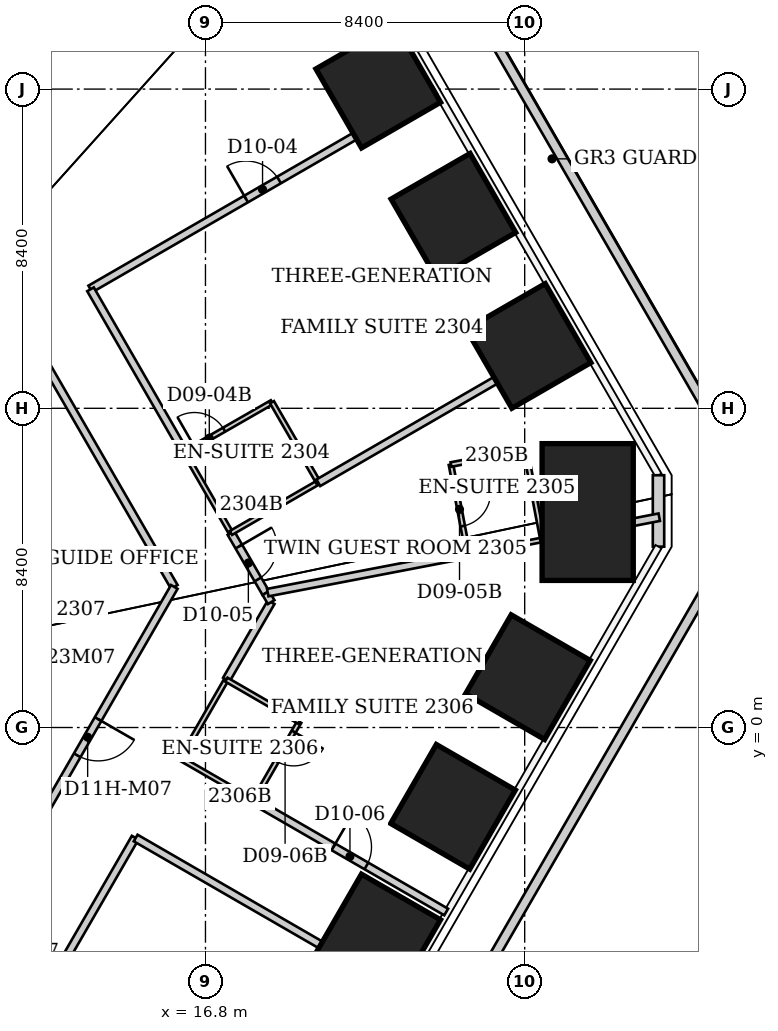
"""IFC4 building model, lengths in metres.
Left out: names, types, materials, properties, quantities, classifications, styles, units other than length and angle.
Written with IfcOpenShell. Run it as: python <this file> out.ifc"""

import sys

from ifc_helpers import new_model, si_unit, direction, frame, frame_2d, origin, origin_2d, place, context, subcontext, project, spatial, rectangle, extrude, clip, halfspace, element, fill, save


model = new_model("IFC4")
c1 = context("Model", 3, precision=1e-05, world=origin(), true_north=direction((0.0, 1.0)))
c2 = subcontext(c1, "Body", "Model", "MODEL_VIEW")
j1 = project(units=[si_unit("LENGTHUNIT", "METRE"), si_unit("PLANEANGLEUNIT", "RADIAN")], contexts=[c1])
p1 = place(None, origin())
s1 = spatial("IfcSite", under=j1, at=p1, CompositionType="ELEMENT")
p2 = place(p1, origin())
s2 = spatial("IfcBuilding", under=s1, at=p2, CompositionType="ELEMENT")
p3 = place(p2, frame((0.0, 0.0, 96.8)))
s3 = spatial("IfcBuildingStorey", under=s2, at=p3, CompositionType="ELEMENT", Elevation=96.8)
p4 = place(p3, frame((21.346, 16.891, -0.063), z_axis=(0.0, 0.0, 1.0), x_axis=(0.866025403784, 0.5, 0.0)))
e1 = element("IfcColumn", 1, at=p4, inside=s3, PredefinedType="COLUMN", context=c2, shape_type="SweptSolid", body=[
    clip(extrude(rectangle(XDim=2.4, YDim=2.4, at=origin_2d()), origin(), (0.0, 0.0, 1.0), 3.863), halfspace(frame((0.0, 0.0, 0.063)), True)),
])
p5 = place(p3, frame((23.324, 13.466, -0.055), z_axis=(0.0, 0.0, 1.0), x_axis=(0.866025403784, 0.5, 0.0)))
e2 = element("IfcColumn", 2, at=p5, inside=s3, PredefinedType="COLUMN", context=c2, shape_type="SweptSolid", body=[
    clip(extrude(rectangle(XDim=2.4, YDim=2.4, at=origin_2d()), origin(), (0.0, 0.0, 1.0), 3.855), halfspace(frame((0.0, 0.0, 0.055)), True)),
])
p6 = place(p3, frame((25.302, 10.041, -0.063), z_axis=(0.0, 0.0, 1.0), x_axis=(0.866025403784, 0.5, 0.0)))
e3 = element("IfcColumn", 3, at=p6, inside=s3, PredefinedType="COLUMN", context=c2, shape_type="SweptSolid", body=[
    clip(extrude(rectangle(XDim=2.4, YDim=2.4, at=origin_2d()), origin(), (0.0, 0.0, 1.0), 3.863), halfspace(frame((0.0, 0.0, 0.063)), True)),
])
p7 = place(p3, frame((26.857, 5.67, -0.074), z_axis=(0.0, 0.0, 1.0), x_axis=(1.0, 0.0, 0.0)))
e4 = element("IfcColumn", 4, at=p7, inside=s3, PredefinedType="COLUMN", context=c2, shape_type="SweptSolid", body=[
    clip(extrude(rectangle(XDim=2.4, YDim=3.6, at=origin_2d()), origin(), (0.0, 0.0, 1.0), 3.874), halfspace(frame((0.0, 0.0, 0.074)), True)),
])
p8 = place(p3, frame((25.284, 1.325, -0.073), z_axis=(0.0, 0.0, 1.0), x_axis=(0.866025403784, -0.5, 0.0)))
e5 = element("IfcColumn", 5, at=p8, inside=s3, PredefinedType="COLUMN", context=c2, shape_type="SweptSolid", body=[
    clip(extrude(rectangle(XDim=2.4, YDim=2.4, at=origin_2d()), origin(), (0.0, 0.0, 1.0), 3.873), halfspace(frame((0.0, 0.0, 0.073)), True)),
])
p9 = place(p3, frame((23.314, -2.087, -0.064), z_axis=(0.0, 0.0, 1.0), x_axis=(0.866025403784, -0.5, 0.0)))
e6 = element("IfcColumn", 6, at=p9, inside=s3, PredefinedType="COLUMN", context=c2, shape_type="SweptSolid", body=[
    clip(extrude(rectangle(XDim=2.4, YDim=2.4, at=origin_2d()), origin(), (0.0, 0.0, 1.0), 3.865), halfspace(frame((0.0, 0.0, 0.064)), True)),
])
p10 = place(p3, frame((21.344, -5.499, -0.056), z_axis=(0.0, 0.0, 1.0), x_axis=(0.866025403784, -0.5, 0.0)))
e7 = element("IfcColumn", 7, at=p10, inside=s3, PredefinedType="COLUMN", context=c2, shape_type="SweptSolid", body=[
    clip(extrude(rectangle(XDim=2.4, YDim=2.4, at=origin_2d()), origin(), (0.0, 0.0, 1.0), 3.856), halfspace(frame((0.0, 0.0, 0.056)), True)),
])
p11 = place(p3, frame((28.721, 6.638, 0.0), z_axis=(0.0, 0.0, 1.0), x_axis=(0.0, -1.0, 0.0)))
e8 = element("IfcWall", 8, at=p11, inside=s3, PredefinedType="SOLIDWALL", context=c2, shape_type="SweptSolid", body=[
    extrude(rectangle(XDim=1.88, YDim=0.3, at=frame_2d((0.94, 0.0))), origin(), (0.0, 0.0, 1.0), 3.64),
])
p12 = place(p3, frame((11.024, -29.171, 0.0), z_axis=(0.0, 0.0, 1.0), x_axis=(0.499999235055, 0.866025845425, 0.0)))
e9 = element("IfcWall", 9, at=p12, inside=s3, PredefinedType="PARAPET", context=c2, shape_type="SweptSolid", body=[
    extrude(rectangle(XDim=39.5, YDim=0.25, at=frame_2d((19.75, 0.0))), origin(), (0.0, 0.0, 1.0), 1.1),
])
p13 = place(p3, frame((30.776, 7.029, 0.0), z_axis=(0.0, 0.0, 1.0), x_axis=(-0.499999656836, 0.86602560191, 0.0)))
e10 = element("IfcWall", 10, at=p13, inside=s3, PredefinedType="PARAPET", context=c2, shape_type="SweptSolid", body=[
    extrude(rectangle(XDim=18.602, YDim=0.25, at=frame_2d((9.301, 0.0))), origin(), (0.0, 0.0, 1.0), 1.1),
])
p14 = place(p3, frame((10.59, -10.45, 0.0), z_axis=(0.0, 0.0, 1.0), x_axis=(0.500072306674, 0.865983653482, 0.0)))
e11 = element("IfcWall", 11, at=p14, inside=s3, PredefinedType="PARTITIONING", context=c2, shape_type="SweptSolid", body=[
    extrude(rectangle(XDim=8.719, YDim=0.2, at=frame_2d((4.359, 0.0))), origin(), (0.0, 0.0, 1.0), 3.64),
])
p15 = place(p14, frame((3.859, 0.0, 0.0)))
e12 = element("IfcOpeningElement", 12, at=p15, cuts=e11, PredefinedType="OPENING", context=c2, shape_type="SweptSolid", body=[
    extrude(rectangle(XDim=1.0, YDim=2.13, at=frame_2d((0.5, 1.065))), frame((0.0, 0.1, 0.0), z_axis=(0.0, -1.0, 0.0), x_axis=(1.0, 0.0, 0.0)), (0.0, 0.0, 1.0), 0.2),
])
p16 = place(p3, frame((11.77, 10.99, 0.0), z_axis=(0.0, 0.0, 1.0), x_axis=(0.500093981358, -0.865971136822, 0.0)))
e13 = element("IfcWall", 13, at=p16, inside=s3, PredefinedType="PARTITIONING", context=c2, shape_type="SweptSolid", body=[
    extrude(rectangle(XDim=8.418, YDim=0.2, at=frame_2d((4.209, 0.0))), origin(), (0.0, 0.0, 1.0), 3.64),
])
p17 = place(p3, frame((13.77, 11.54, 0.0), z_axis=(0.0, 0.0, 1.0), x_axis=(0.865951726818, 0.500127590541, 0.0)))
e14 = element("IfcWall", 14, at=p17, inside=s3, PredefinedType="PARTITIONING", context=c2, shape_type="SweptSolid", body=[
    extrude(rectangle(XDim=10.467, YDim=0.2, at=frame_2d((5.233, 0.0))), origin(), (0.0, 0.0, 1.0), 3.64),
])
p18 = place(p17, frame((4.734, 0.0, 0.0)))
e15 = element("IfcOpeningElement", 15, at=p18, cuts=e14, PredefinedType="OPENING", context=c2, shape_type="SweptSolid", body=[
    extrude(rectangle(XDim=1.0, YDim=2.13, at=frame_2d((0.5, 1.065))), frame((0.0, 0.1, 0.0), z_axis=(0.0, -1.0, 0.0), x_axis=(1.0, 0.0, 0.0)), (0.0, 0.0, 1.0), 0.2),
])
p19 = place(p3, frame((13.775, 11.531, 0.0), z_axis=(0.0, 0.0, 1.0), x_axis=(0.499378257914, -0.866384069292, 0.0)))
e16 = element("IfcWall", 16, at=p19, inside=s3, PredefinedType="PARTITIONING", context=c2, shape_type="SweptSolid", body=[
    extrude(rectangle(XDim=4.954, YDim=0.2, at=frame_2d((2.477, 0.0))), origin(), (0.0, 0.0, 1.0), 3.64),
])
p20 = place(p3, frame((14.963, -2.907, 0.0), z_axis=(0.0, 0.0, 1.0), x_axis=(0.865876457216, -0.50025789433, 0.0)))
e17 = element("IfcWall", 17, at=p20, inside=s3, PredefinedType="PARTITIONING", context=c2, shape_type="SweptSolid", body=[
    extrude(rectangle(XDim=8.051, YDim=0.2, at=frame_2d((4.025, 0.0))), origin(), (0.0, 0.0, 1.0), 3.64),
])
p21 = place(p3, frame((15.98, 3.7, 0.0), z_axis=(0.0, 0.0, 1.0), x_axis=(-0.499446957289, -0.866344467781, 0.0)))
e18 = element("IfcWall", 18, at=p21, inside=s3, PredefinedType="PARTITIONING", context=c2, shape_type="SweptSolid", body=[
    extrude(rectangle(XDim=9.13, YDim=0.2, at=frame_2d((4.565, 0.0))), origin(), (0.0, 0.0, 1.0), 3.64),
])
p22 = place(p21, frame((4.015, 0.0, 0.0)))
e19 = element("IfcOpeningElement", 19, at=p22, cuts=e18, PredefinedType="OPENING", context=c2, shape_type="SweptSolid", body=[
    extrude(rectangle(XDim=1.1, YDim=2.2, at=frame_2d((0.55, 1.1))), frame((0.0, 0.1, 0.0), z_axis=(0.0, -1.0, 0.0), x_axis=(1.0, 0.0, 0.0)), (0.0, 0.0, 1.0), 0.2),
])
p23 = place(p3, frame((16.15, -0.82, 0.0), z_axis=(0.0, 0.0, 1.0), x_axis=(0.499769390944, 0.866158505053, 0.0)))
e20 = element("IfcWall", 20, at=p23, inside=s3, PredefinedType="PARTITIONING", context=c2, shape_type="SweptSolid", body=[
    extrude(rectangle(XDim=2.402, YDim=0.12, at=frame_2d((1.201, 0.0))), origin(), (0.0, 0.0, 1.0), 3.64),
])
p24 = place(p3, frame((16.15, -0.82, 0.0), z_axis=(0.0, 0.0, 1.0), x_axis=(0.865780289733, -0.50042430987, 0.0)))
e21 = element("IfcWall", 21, at=p24, inside=s3, PredefinedType="PARTITIONING", context=c2, shape_type="SweptSolid", body=[
    extrude(rectangle(XDim=2.218, YDim=0.12, at=frame_2d((1.109, 0.0))), origin(), (0.0, 0.0, 1.0), 3.64),
])
p25 = place(p3, frame((16.249, 7.239, 0.0), z_axis=(0.0, 0.0, 1.0), x_axis=(0.499296083727, -0.866431428778, 0.0)))
e22 = element("IfcWall", 22, at=p25, inside=s3, PredefinedType="PARTITIONING", context=c2, shape_type="SweptSolid", body=[
    extrude(rectangle(XDim=2.446, YDim=0.12, at=frame_2d((1.223, 0.0))), origin(), (0.0, 0.0, 1.0), 3.64),
])
p26 = place(p3, frame((17.35, 1.26, 0.0), z_axis=(0.0, 0.0, 1.0), x_axis=(0.500672785493, 0.8656366223, 0.0)))
e23 = element("IfcWall", 23, at=p26, inside=s3, PredefinedType="PARTITIONING", context=c2, shape_type="SweptSolid", body=[
    extrude(rectangle(XDim=2.357, YDim=0.2, at=frame_2d((1.178, 0.0))), origin(), (0.0, 0.0, 1.0), 3.64),
])
p27 = place(p3, frame((17.47, 5.12, 0.0), z_axis=(0.0, 0.0, 1.0), x_axis=(0.501536229379, -0.865136642745, 0.0)))
e24 = element("IfcWall", 24, at=p27, inside=s3, PredefinedType="PARTITIONING", context=c2, shape_type="SweptSolid", body=[
    extrude(rectangle(XDim=1.828, YDim=0.2, at=frame_2d((0.914, 0.0))), origin(), (0.0, 0.0, 1.0), 3.64),
])
p28 = place(p27, frame((0.414, 0.0, 0.0)))
e25 = element("IfcOpeningElement", 25, at=p28, cuts=e24, PredefinedType="OPENING", context=c2, shape_type="SweptSolid", body=[
    extrude(rectangle(XDim=1.0, YDim=2.13, at=frame_2d((0.5, 1.065))), frame((0.0, 0.1, 0.0), z_axis=(0.0, -1.0, 0.0), x_axis=(1.0, 0.0, 0.0)), (0.0, 0.0, 1.0), 0.2),
])
p29 = place(p3, frame((17.47, 5.12, 0.0), z_axis=(0.0, 0.0, 1.0), x_axis=(0.865715544058, 0.500536309148, 0.0)))
e26 = element("IfcWall", 26, at=p29, inside=s3, PredefinedType="PARTITIONING", context=c2, shape_type="SweptSolid", body=[
    extrude(rectangle(XDim=2.657, YDim=0.12, at=frame_2d((1.328, 0.0))), origin(), (0.0, 0.0, 1.0), 3.64),
])
p30 = place(p3, frame((18.07, -1.93, 0.0), z_axis=(0.0, 0.0, 1.0), x_axis=(0.499737123639, 0.866177122335, 0.0)))
e27 = element("IfcWall", 27, at=p30, inside=s3, PredefinedType="PARTITIONING", context=c2, shape_type="SweptSolid", body=[
    extrude(rectangle(XDim=2.401, YDim=0.12, at=frame_2d((1.201, 0.0))), origin(), (0.0, 0.0, 1.0), 3.64),
])
p31 = place(p30, frame((1.201, 0.0, 0.0)))
e28 = element("IfcOpeningElement", 28, at=p31, cuts=e27, PredefinedType="OPENING", context=c2, shape_type="SweptSolid", body=[
    extrude(rectangle(XDim=0.9, YDim=2.03, at=frame_2d((0.45, 1.015))), frame((0.0, 0.06, 0.0), z_axis=(0.0, -1.0, 0.0), x_axis=(1.0, 0.0, 0.0)), (0.0, 0.0, 1.0), 0.12),
])
p32 = place(p3, frame((18.07, -1.93, 0.0), z_axis=(0.0, 0.0, 1.0), x_axis=(0.865924141063, -0.500175351175, 0.0)))
e29 = element("IfcWall", 29, at=p32, inside=s3, PredefinedType="PARTITIONING", context=c2, shape_type="SweptSolid", body=[
    extrude(rectangle(XDim=5.848, YDim=0.2, at=frame_2d((2.924, 0.0))), origin(), (0.0, 0.0, 1.0), 3.64),
])
p33 = place(p32, frame((2.424, 0.0, 0.0)))
e30 = element("IfcOpeningElement", 30, at=p33, cuts=e29, PredefinedType="OPENING", context=c2, shape_type="SweptSolid", body=[
    extrude(rectangle(XDim=1.0, YDim=2.13, at=frame_2d((0.5, 1.065))), frame((0.0, 0.1, 0.0), z_axis=(0.0, -1.0, 0.0), x_axis=(1.0, 0.0, 0.0)), (0.0, 0.0, 1.0), 0.2),
])
p34 = place(p3, frame((18.387, 3.538, 0.0), z_axis=(0.0, 0.0, 1.0), x_axis=(0.514754090884, -0.857337871506, 0.0)))
e31 = element("IfcWall", 31, at=p34, inside=s3, PredefinedType="PARTITIONING", context=c2, shape_type="SweptSolid", body=[
    extrude(rectangle(XDim=0.278, YDim=0.2, at=frame_2d((0.139, 0.0))), origin(), (0.0, 0.0, 1.0), 3.64),
])
p35 = place(p3, frame((18.439, 3.549, 0.0), z_axis=(0.0, 0.0, 1.0), x_axis=(0.982105276165, 0.188332754797, 0.0)))
e32 = element("IfcWall", 32, at=p35, inside=s3, PredefinedType="PARTITIONING", context=c2, shape_type="SweptSolid", body=[
    extrude(rectangle(XDim=5.367, YDim=0.2, at=frame_2d((2.683, 0.0))), origin(), (0.0, 0.0, 1.0), 3.64),
])
p36 = place(p3, frame((18.55, 8.56, 0.0), z_axis=(0.0, 0.0, 1.0), x_axis=(-0.867306827682, -0.497773911185, 0.0)))
e33 = element("IfcWall", 33, at=p36, inside=s3, PredefinedType="PARTITIONING", context=c2, shape_type="SweptSolid", body=[
    extrude(rectangle(XDim=2.652, YDim=0.12, at=frame_2d((1.326, 0.0))), origin(), (0.0, 0.0, 1.0), 2.726),
])
p37 = place(p36, frame((1.452, 0.0, 0.0)))
e34 = element("IfcOpeningElement", 34, at=p37, cuts=e33, PredefinedType="OPENING", context=c2, shape_type="SweptSolid", body=[
    extrude(rectangle(XDim=0.9, YDim=2.03, at=frame_2d((0.45, 1.015))), frame((0.0, 0.06, 0.0), z_axis=(0.0, -1.0, 0.0), x_axis=(1.0, 0.0, 0.0)), (0.0, 0.0, 1.0), 0.12),
])
p38 = place(p3, frame((19.27, 0.15, 0.0), z_axis=(0.0, 0.0, 1.0), x_axis=(-0.865732595383, 0.500506816428, 0.0)))
e35 = element("IfcWall", 35, at=p38, inside=s3, PredefinedType="PARTITIONING", context=c2, shape_type="SweptSolid", body=[
    extrude(rectangle(XDim=2.218, YDim=0.12, at=frame_2d((1.109, 0.0))), origin(), (0.0, 0.0, 1.0), 3.038),
])
p39 = place(p3, frame((19.77, 6.45, 0.0), z_axis=(0.0, 0.0, 1.0), x_axis=(-0.500522890398, 0.865723302324, 0.0)))
e36 = element("IfcWall", 36, at=p39, inside=s3, PredefinedType="PARTITIONING", context=c2, shape_type="SweptSolid", body=[
    extrude(rectangle(XDim=2.438, YDim=0.12, at=frame_2d((1.219, 0.0))), origin(), (0.0, 0.0, 1.0), 3.64),
])
p40 = place(p3, frame((23.26, 6.92, 0.0), z_axis=(0.0, 0.0, 1.0), x_axis=(0.187294228499, -0.982303859288, 0.0)))
e37 = element("IfcWall", 37, at=p40, inside=s3, PredefinedType="PARTITIONING", context=c2, shape_type="SweptSolid", body=[
    extrude(rectangle(XDim=2.402, YDim=0.12, at=frame_2d((1.201, 0.0))), origin(), (0.0, 0.0, 1.0), 3.64),
])
p41 = place(p40, frame((0.75, 0.0, 0.0)))
e38 = element("IfcOpeningElement", 38, at=p41, cuts=e37, PredefinedType="OPENING", context=c2, shape_type="SweptSolid", body=[
    extrude(rectangle(XDim=0.9, YDim=2.03, at=frame_2d((0.45, 1.015))), frame((0.0, 0.06, 0.0), z_axis=(0.0, -1.0, 0.0), x_axis=(1.0, 0.0, 0.0)), (0.0, 0.0, 1.0), 0.12),
])
p42 = place(p3, frame((23.71, 4.56, 0.0), z_axis=(0.0, 0.0, 1.0), x_axis=(0.981729772821, 0.190280459207, 0.0)))
e39 = element("IfcWall", 39, at=p42, inside=s3, PredefinedType="PARTITIONING", context=c2, shape_type="SweptSolid", body=[
    extrude(rectangle(XDim=1.996, YDim=0.12, at=frame_2d((0.998, 0.0))), origin(), (0.0, 0.0, 1.0), 3.64),
])
p43 = place(p3, frame((25.22, 7.3, 0.0), z_axis=(0.0, 0.0, 1.0), x_axis=(-0.981706922352, -0.190398315658, 0.0)))
e40 = element("IfcWall", 40, at=p43, inside=s3, PredefinedType="PARTITIONING", context=c2, shape_type="SweptSolid", body=[
    extrude(rectangle(XDim=1.997, YDim=0.12, at=frame_2d((0.998, 0.0))), origin(), (0.0, 0.0, 1.0), 3.64),
])
p44 = place(p3, frame((25.67, 4.94, 0.0), z_axis=(0.0, 0.0, 1.0), x_axis=(-0.187275533444, 0.982307423658, 0.0)))
e41 = element("IfcWall", 41, at=p44, inside=s3, PredefinedType="PARTITIONING", context=c2, shape_type="SweptSolid", body=[
    extrude(rectangle(XDim=2.403, YDim=0.12, at=frame_2d((1.201, 0.0))), origin(), (0.0, 0.0, 1.0), 3.64),
])
p45 = place(p3, frame((25.67, 4.94, 0.0), z_axis=(0.0, 0.0, 1.0), x_axis=(0.981783608641, 0.190002488943, 0.0)))
e42 = element("IfcWall", 42, at=p45, inside=s3, PredefinedType="PARTITIONING", context=c2, shape_type="SweptSolid", body=[
    extrude(rectangle(XDim=3.127, YDim=0.2, at=frame_2d((1.564, 0.0))), origin(), (0.0, 0.0, 1.0), 3.64),
])
p46 = place(p3, frame((26.466, 10.31, 0.0), z_axis=(0.0, 0.0, 1.0), x_axis=(-0.865792743708, -0.500402762725, 0.0)))
e43 = element("IfcWall", 43, at=p46, inside=s3, PredefinedType="PARTITIONING", context=c2, shape_type="SweptSolid", body=[
    extrude(rectangle(XDim=7.734, YDim=0.2, at=frame_2d((3.867, 0.0))), origin(), (0.0, 0.0, 1.0), 3.64),
])
p47 = place(p18, origin())
e44 = element("IfcDoor", 44, at=p47, inside=s3, OperationType="SINGLE_SWING_LEFT", PredefinedType="DOOR", context=c2, shape_type="SweptSolid", body=[
    extrude(rectangle(XDim=1.0, YDim=2.13, at=frame_2d((0.5, 1.065))), frame((0.0, 0.025, 0.0), z_axis=(0.0, -1.0, 0.0), x_axis=(1.0, 0.0, 0.0)), (0.0, 0.0, 1.0), 0.05),
])
fill(e15, e44)
p48 = place(p37, origin())
e45 = element("IfcDoor", 45, at=p48, inside=s3, OperationType="SINGLE_SWING_RIGHT", PredefinedType="DOOR", context=c2, shape_type="SweptSolid", body=[
    extrude(rectangle(XDim=0.9, YDim=2.03, at=frame_2d((0.45, 1.015))), frame((0.0, 0.025, 0.0), z_axis=(0.0, -1.0, 0.0), x_axis=(1.0, 0.0, 0.0)), (0.0, 0.0, 1.0), 0.05),
])
fill(e34, e45)
p49 = place(p28, origin())
e46 = element("IfcDoor", 46, at=p49, inside=s3, OperationType="SINGLE_SWING_LEFT", PredefinedType="DOOR", context=c2, shape_type="SweptSolid", body=[
    extrude(rectangle(XDim=1.0, YDim=2.13, at=frame_2d((0.5, 1.065))), frame((0.0, 0.025, 0.0), z_axis=(0.0, -1.0, 0.0), x_axis=(1.0, 0.0, 0.0)), (0.0, 0.0, 1.0), 0.05),
])
fill(e25, e46)
p50 = place(p41, origin())
e47 = element("IfcDoor", 47, at=p50, inside=s3, OperationType="SINGLE_SWING_LEFT", PredefinedType="DOOR", context=c2, shape_type="SweptSolid", body=[
    extrude(rectangle(XDim=0.9, YDim=2.03, at=frame_2d((0.45, 1.015))), frame((0.0, 0.025, 0.0), z_axis=(0.0, -1.0, 0.0), x_axis=(1.0, 0.0, 0.0)), (0.0, 0.0, 1.0), 0.05),
])
fill(e38, e47)
p51 = place(p33, origin())
e48 = element("IfcDoor", 48, at=p51, inside=s3, OperationType="SINGLE_SWING_LEFT", PredefinedType="DOOR", context=c2, shape_type="SweptSolid", body=[
    extrude(rectangle(XDim=1.0, YDim=2.13, at=frame_2d((0.5, 1.065))), frame((0.0, 0.025, 0.0), z_axis=(0.0, -1.0, 0.0), x_axis=(1.0, 0.0, 0.0)), (0.0, 0.0, 1.0), 0.05),
])
fill(e30, e48)
p52 = place(p31, origin())
e49 = element("IfcDoor", 49, at=p52, inside=s3, OperationType="SINGLE_SWING_RIGHT", PredefinedType="DOOR", context=c2, shape_type="SweptSolid", body=[
    extrude(rectangle(XDim=0.9, YDim=2.03, at=frame_2d((0.45, 1.015))), frame((0.0, 0.025, 0.0), z_axis=(0.0, -1.0, 0.0), x_axis=(1.0, 0.0, 0.0)), (0.0, 0.0, 1.0), 0.05),
])
fill(e28, e49)
p53 = place(p22, origin())
e50 = element("IfcDoor", 50, at=p53, inside=s3, OperationType="SINGLE_SWING_LEFT", PredefinedType="DOOR", context=c2, shape_type="SweptSolid", body=[
    extrude(rectangle(XDim=1.1, YDim=2.2, at=frame_2d((0.55, 1.1))), frame((0.0, 0.025, 0.0), z_axis=(0.0, -1.0, 0.0), x_axis=(1.0, 0.0, 0.0)), (0.0, 0.0, 1.0), 0.05),
])
fill(e19, e50)
save(model, sys.argv[1])
